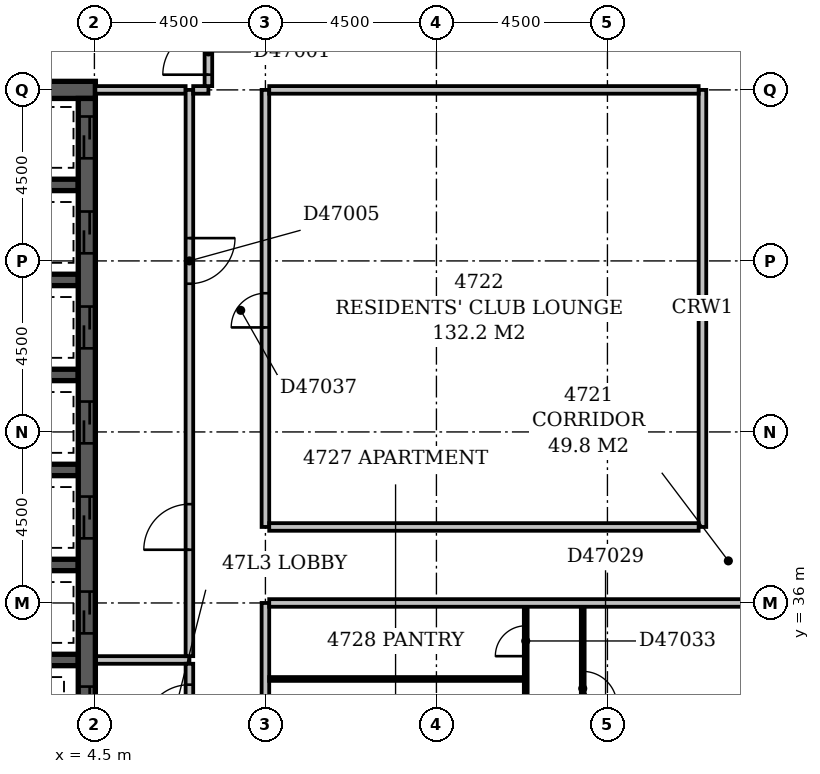
"""IFC4 building model, lengths in metres.
Left out: names, types, materials, properties, quantities, classifications, styles, units other than length and angle.
Written with IfcOpenShell. Run it as: python <this file> out.ifc"""

import sys

from ifc_helpers import new_model, si_unit, direction, frame, frame_2d, origin, place, context, subcontext, project, spatial, rectangle, extrude, element, fill, save


model = new_model("IFC4")
c1 = context("Model", 3, precision=1e-05, world=origin(), true_north=direction((0.0, 1.0)))
c2 = subcontext(c1, "Body", "Model", "MODEL_VIEW")
j1 = project(units=[si_unit("LENGTHUNIT", "METRE"), si_unit("PLANEANGLEUNIT", "RADIAN")], contexts=[c1])
p1 = place(None, origin())
s1 = spatial("IfcSite", under=j1, at=p1, CompositionType="ELEMENT")
p2 = place(p1, origin())
s2 = spatial("IfcBuilding", under=s1, at=p2, CompositionType="ELEMENT")
p3 = place(p2, frame((0.0, 0.0, 186.2)))
s3 = spatial("IfcBuildingStorey", under=s2, at=p3, CompositionType="ELEMENT", Elevation=186.2)
p4 = place(p3, frame((0.275, 49.5, -0.35), z_axis=(0.0, 0.0, 1.0), x_axis=(1.0, 0.0, 0.0)))
e1 = element("IfcWall", 1, at=p4, inside=s3, PredefinedType="SHEAR", context=c2, shape_type="SweptSolid", body=[
    extrude(rectangle(XDim=4.25, YDim=0.45, at=frame_2d((2.125, 0.0))), origin(), (0.0, 0.0, 1.0), 3.65),
])
for number, where, z_axis, x_axis in (
    (2, (0.725, 34.5, -0.35), (0.0, 0.0, 1.0), (1.0, 0.0, 0.0)),
    (3, (0.725, 37.0, -0.35), (0.0, 0.0, 1.0), (1.0, 0.0, 0.0)),
    (4, (0.725, 39.5, -0.35), (0.0, 0.0, 1.0), (1.0, 0.0, 0.0)),
    (5, (0.725, 42.0, -0.35), (0.0, 0.0, 1.0), (1.0, 0.0, 0.0)),
    (6, (0.725, 44.5, -0.35), (0.0, 0.0, 1.0), (1.0, 0.0, 0.0)),
    (7, (0.725, 47.0, -0.35), (0.0, 0.0, 1.0), (1.0, 0.0, 0.0)),
):
    element("IfcWall", number, at=place(p3, frame(where, z_axis=z_axis, x_axis=x_axis)), inside=s3, PredefinedType="SHEAR", context=c2, shape_type="SweptSolid", body=[
        extrude(rectangle(XDim=3.35, YDim=0.3, at=frame_2d((1.675, 0.0))), origin(), (0.0, 0.0, 1.0), 3.65),
    ])
p5 = place(p3, frame((4.3, 27.15, -0.35), z_axis=(0.0, 0.0, 1.0), x_axis=(0.0, 1.0, 0.0)))
e8 = element("IfcWall", 8, at=p5, inside=s3, PredefinedType="SHEAR", context=c2, shape_type="SweptSolid", body=[
    extrude(rectangle(XDim=22.125, YDim=0.45, at=frame_2d((11.062, 0.0))), origin(), (0.0, 0.0, 1.0), 3.65),
])
p6 = place(p5, frame((3.05, 0.0, 0.35)))
e9 = element("IfcOpeningElement", 9, at=p6, cuts=e8, PredefinedType="OPENING", context=c2, shape_type="SweptSolid", body=[
    extrude(rectangle(XDim=1.1, YDim=2.1, at=frame_2d((0.55, 1.05))), frame((0.0, 0.237, 0.0), z_axis=(0.0, -1.0, 0.0), x_axis=(1.0, 0.0, 0.0)), (0.0, 0.0, 1.0), 0.474),
])
p7 = place(p5, frame((0.55, 0.0, 0.35)))
e10 = element("IfcOpeningElement", 10, at=p7, cuts=e8, PredefinedType="OPENING", context=c2, shape_type="SweptSolid", body=[
    extrude(rectangle(XDim=1.1, YDim=2.1, at=frame_2d((0.55, 1.05))), frame((0.0, 0.237, 0.0), z_axis=(0.0, -1.0, 0.0), x_axis=(1.0, 0.0, 0.0)), (0.0, 0.0, 1.0), 0.474),
])
p8 = place(p5, frame((20.55, 0.0, 0.35)))
e11 = element("IfcOpeningElement", 11, at=p8, cuts=e8, PredefinedType="OPENING", context=c2, shape_type="SweptSolid", body=[
    extrude(rectangle(XDim=1.1, YDim=2.1, at=frame_2d((0.55, 1.05))), frame((0.0, 0.237, 0.0), z_axis=(0.0, -1.0, 0.0), x_axis=(1.0, 0.0, 0.0)), (0.0, 0.0, 1.0), 0.474),
])
p9 = place(p5, frame((18.05, 0.0, 0.35)))
e12 = element("IfcOpeningElement", 12, at=p9, cuts=e8, PredefinedType="OPENING", context=c2, shape_type="SweptSolid", body=[
    extrude(rectangle(XDim=1.1, YDim=2.1, at=frame_2d((0.55, 1.05))), frame((0.0, 0.237, 0.0), z_axis=(0.0, -1.0, 0.0), x_axis=(1.0, 0.0, 0.0)), (0.0, 0.0, 1.0), 0.474),
])
p10 = place(p5, frame((15.55, 0.0, 0.35)))
e13 = element("IfcOpeningElement", 13, at=p10, cuts=e8, PredefinedType="OPENING", context=c2, shape_type="SweptSolid", body=[
    extrude(rectangle(XDim=1.1, YDim=2.1, at=frame_2d((0.55, 1.05))), frame((0.0, 0.237, 0.0), z_axis=(0.0, -1.0, 0.0), x_axis=(1.0, 0.0, 0.0)), (0.0, 0.0, 1.0), 0.474),
])
p11 = place(p5, frame((13.05, 0.0, 0.35)))
e14 = element("IfcOpeningElement", 14, at=p11, cuts=e8, PredefinedType="OPENING", context=c2, shape_type="SweptSolid", body=[
    extrude(rectangle(XDim=1.1, YDim=2.1, at=frame_2d((0.55, 1.05))), frame((0.0, 0.237, 0.0), z_axis=(0.0, -1.0, 0.0), x_axis=(1.0, 0.0, 0.0)), (0.0, 0.0, 1.0), 0.474),
])
p12 = place(p5, frame((10.55, 0.0, 0.35)))
e15 = element("IfcOpeningElement", 15, at=p12, cuts=e8, PredefinedType="OPENING", context=c2, shape_type="SweptSolid", body=[
    extrude(rectangle(XDim=1.1, YDim=2.1, at=frame_2d((0.55, 1.05))), frame((0.0, 0.237, 0.0), z_axis=(0.0, -1.0, 0.0), x_axis=(1.0, 0.0, 0.0)), (0.0, 0.0, 1.0), 0.474),
])
p13 = place(p5, frame((8.05, 0.0, 0.35)))
e16 = element("IfcOpeningElement", 16, at=p13, cuts=e8, PredefinedType="OPENING", context=c2, shape_type="SweptSolid", body=[
    extrude(rectangle(XDim=1.1, YDim=2.1, at=frame_2d((0.55, 1.05))), frame((0.0, 0.237, 0.0), z_axis=(0.0, -1.0, 0.0), x_axis=(1.0, 0.0, 0.0)), (0.0, 0.0, 1.0), 0.474),
])
p14 = place(p5, frame((5.55, 0.0, 0.35)))
e17 = element("IfcOpeningElement", 17, at=p14, cuts=e8, PredefinedType="OPENING", context=c2, shape_type="SweptSolid", body=[
    extrude(rectangle(XDim=1.1, YDim=2.1, at=frame_2d((0.55, 1.05))), frame((0.0, 0.237, 0.0), z_axis=(0.0, -1.0, 0.0), x_axis=(1.0, 0.0, 0.0)), (0.0, 0.0, 1.0), 0.474),
])
p15 = place(p3, frame((4.545, 34.5, 0.0), z_axis=(0.0, 0.0, 1.0), x_axis=(1.0, 0.0, 0.0)))
e18 = element("IfcWall", 18, at=p15, inside=s3, PredefinedType="PARTITIONING", context=c2, shape_type="SweptSolid", body=[
    extrude(rectangle(XDim=2.455, YDim=0.2, at=frame_2d((1.228, 0.0))), origin(), (0.0, 0.0, 1.0), 3.3),
])
p16 = place(p3, frame((7.0, 34.6, 0.0), z_axis=(0.0, 0.0, 1.0), x_axis=(0.0, 1.0, 0.0)))
e19 = element("IfcWall", 19, at=p16, inside=s3, PredefinedType="PARTITIONING", context=c2, shape_type="SweptSolid", body=[
    extrude(rectangle(XDim=14.9, YDim=0.2, at=frame_2d((7.45, 0.0))), origin(), (0.0, 0.0, 1.0), 3.3),
])
p17 = place(p16, frame((2.8, 0.0, 0.0)))
e20 = element("IfcOpeningElement", 20, at=p17, cuts=e19, PredefinedType="OPENING", context=c2, shape_type="SweptSolid", body=[
    extrude(rectangle(XDim=1.2, YDim=2.1, at=frame_2d((0.6, 1.05))), frame((0.0, 0.112, 0.0), z_axis=(0.0, -1.0, 0.0), x_axis=(1.0, 0.0, 0.0)), (0.0, 0.0, 1.0), 0.224),
])
p18 = place(p16, frame((9.8, 0.0, 0.0)))
e21 = element("IfcOpeningElement", 21, at=p18, cuts=e19, PredefinedType="OPENING", context=c2, shape_type="SweptSolid", body=[
    extrude(rectangle(XDim=1.2, YDim=2.1, at=frame_2d((0.6, 1.05))), frame((0.0, 0.112, 0.0), z_axis=(0.0, -1.0, 0.0), x_axis=(1.0, 0.0, 0.0)), (0.0, 0.0, 1.0), 0.224),
])
p19 = place(p3, frame((4.525, 49.5, 0.0), z_axis=(0.0, 0.0, 1.0), x_axis=(1.0, 0.0, 0.0)))
e22 = element("IfcWall", 22, at=p19, inside=s3, PredefinedType="PARTITIONING", context=c2, shape_type="SweptSolid", body=[
    extrude(rectangle(XDim=2.375, YDim=0.2, at=frame_2d((1.188, 0.0))), origin(), (0.0, 0.0, 1.0), 3.3),
])
p20 = place(p3, frame((7.0, 32.1, 0.0), z_axis=(0.0, 0.0, 1.0), x_axis=(0.0, 1.0, 0.0)))
e23 = element("IfcWall", 23, at=p20, inside=s3, PredefinedType="PARTITIONING", context=c2, shape_type="SweptSolid", body=[
    extrude(rectangle(XDim=2.3, YDim=0.2, at=frame_2d((1.15, 0.0))), origin(), (0.0, 0.0, 1.0), 3.3),
])
p21 = place(p20, frame((0.55, 0.0, 0.0)))
e24 = element("IfcOpeningElement", 24, at=p21, cuts=e23, PredefinedType="OPENING", context=c2, shape_type="SweptSolid", body=[
    extrude(rectangle(XDim=1.2, YDim=2.1, at=frame_2d((0.6, 1.05))), frame((0.0, 0.112, 0.0), z_axis=(0.0, -1.0, 0.0), x_axis=(1.0, 0.0, 0.0)), (0.0, 0.0, 1.0), 0.224),
])
p22 = place(p3, frame((7.1, 49.5, 0.0), z_axis=(0.0, 0.0, 1.0), x_axis=(1.0, 0.0, 0.0)))
e25 = element("IfcWall", 25, at=p22, inside=s3, PredefinedType="PARTITIONING", context=c2, shape_type="SweptSolid", body=[
    extrude(rectangle(XDim=0.4, YDim=0.2, at=frame_2d((0.2, 0.0))), origin(), (0.0, 0.0, 1.0), 3.3),
])
p23 = place(p3, frame((7.5, 49.6, 0.0), z_axis=(0.0, 0.0, 1.0), x_axis=(0.0, 1.0, 0.0)))
e26 = element("IfcWall", 26, at=p23, inside=s3, PredefinedType="PARTITIONING", context=c2, shape_type="SweptSolid", body=[
    extrude(rectangle(XDim=3.9, YDim=0.2, at=frame_2d((1.95, 0.0))), origin(), (0.0, 0.0, 1.0), 3.3),
])
p24 = place(p23, frame((0.3, 0.0, 0.0)))
e27 = element("IfcOpeningElement", 27, at=p24, cuts=e26, PredefinedType="OPENING", context=c2, shape_type="SweptSolid", body=[
    extrude(rectangle(XDim=1.2, YDim=2.1, at=frame_2d((0.6, 1.05))), frame((0.0, 0.112, 0.0), z_axis=(0.0, -1.0, 0.0), x_axis=(1.0, 0.0, 0.0)), (0.0, 0.0, 1.0), 0.224),
])
p25 = place(p3, frame((9.0, 5.0, 0.0), z_axis=(0.0, 0.0, 1.0), x_axis=(0.0, 1.0, 0.0)))
e28 = element("IfcWall", 28, at=p25, inside=s3, PredefinedType="PARTITIONING", context=c2, shape_type="SweptSolid", body=[
    extrude(rectangle(XDim=31.0, YDim=0.2, at=frame_2d((15.5, 0.0))), origin(), (0.0, 0.0, 1.0), 3.3),
])
p26 = place(p25, frame((17.8, 0.0, 0.0)))
e29 = element("IfcOpeningElement", 29, at=p26, cuts=e28, PredefinedType="OPENING", context=c2, shape_type="SweptSolid", body=[
    extrude(rectangle(XDim=1.0, YDim=2.1, at=frame_2d((0.5, 1.05))), frame((0.0, 0.112, 0.0), z_axis=(0.0, -1.0, 0.0), x_axis=(1.0, 0.0, 0.0)), (0.0, 0.0, 1.0), 0.224),
])
p27 = place(p25, frame((14.95, 0.0, 0.0)))
e30 = element("IfcOpeningElement", 30, at=p27, cuts=e28, PredefinedType="OPENING", context=c2, shape_type="SweptSolid", body=[
    extrude(rectangle(XDim=1.0, YDim=2.1, at=frame_2d((0.5, 1.05))), frame((0.0, 0.112, 0.0), z_axis=(0.0, -1.0, 0.0), x_axis=(1.0, 0.0, 0.0)), (0.0, 0.0, 1.0), 0.224),
])
p28 = place(p25, frame((9.3, 0.0, 0.0)))
e31 = element("IfcOpeningElement", 31, at=p28, cuts=e28, PredefinedType="OPENING", context=c2, shape_type="SweptSolid", body=[
    extrude(rectangle(XDim=1.0, YDim=2.1, at=frame_2d((0.5, 1.05))), frame((0.0, 0.112, 0.0), z_axis=(0.0, -1.0, 0.0), x_axis=(1.0, 0.0, 0.0)), (0.0, 0.0, 1.0), 0.224),
])
p29 = place(p25, frame((1.5, 0.0, 0.0)))
e32 = element("IfcOpeningElement", 32, at=p29, cuts=e28, PredefinedType="OPENING", context=c2, shape_type="SweptSolid", body=[
    extrude(rectangle(XDim=0.9, YDim=2.1, at=frame_2d((0.45, 1.05))), frame((0.0, 0.112, 0.0), z_axis=(0.0, -1.0, 0.0), x_axis=(1.0, 0.0, 0.0)), (0.0, 0.0, 1.0), 0.224),
])
p30 = place(p3, frame((17.35, 22.6, 0.0), z_axis=(0.0, 0.0, 1.0), x_axis=(0.0, 1.0, 0.0)))
e33 = element("IfcWall", 33, at=p30, inside=s3, PredefinedType="PARTITIONING", context=c2, shape_type="SweptSolid", body=[
    extrude(rectangle(XDim=13.3, YDim=0.1, at=frame_2d((6.65, 0.0))), origin(), (0.0, 0.0, 1.0), 3.3),
])
p31 = place(p30, frame((1.7, 0.0, 0.0)))
e34 = element("IfcOpeningElement", 34, at=p31, cuts=e33, PredefinedType="OPENING", context=c2, shape_type="SweptSolid", body=[
    extrude(rectangle(XDim=0.9, YDim=2.1, at=frame_2d((0.45, 1.05))), frame((0.0, 0.062, 0.0), z_axis=(0.0, -1.0, 0.0), x_axis=(1.0, 0.0, 0.0)), (0.0, 0.0, 1.0), 0.124),
])
p32 = place(p30, frame((7.35, 0.0, 0.0)))
e35 = element("IfcOpeningElement", 35, at=p32, cuts=e33, PredefinedType="OPENING", context=c2, shape_type="SweptSolid", body=[
    extrude(rectangle(XDim=0.9, YDim=2.1, at=frame_2d((0.45, 1.05))), frame((0.0, 0.062, 0.0), z_axis=(0.0, -1.0, 0.0), x_axis=(1.0, 0.0, 0.0)), (0.0, 0.0, 1.0), 0.124),
])
p33 = place(p30, frame((10.7, 0.0, 0.0)))
e36 = element("IfcOpeningElement", 36, at=p33, cuts=e33, PredefinedType="OPENING", context=c2, shape_type="SweptSolid", body=[
    extrude(rectangle(XDim=0.9, YDim=2.1, at=frame_2d((0.45, 1.05))), frame((0.0, 0.062, 0.0), z_axis=(0.0, -1.0, 0.0), x_axis=(1.0, 0.0, 0.0)), (0.0, 0.0, 1.0), 0.124),
])
p34 = place(p3, frame((15.85, 24.1, 0.0), z_axis=(0.0, 0.0, 1.0), x_axis=(0.0, 1.0, 0.0)))
e37 = element("IfcWall", 37, at=p34, inside=s3, PredefinedType="PARTITIONING", context=c2, shape_type="SweptSolid", body=[
    extrude(rectangle(XDim=11.8, YDim=0.1, at=frame_2d((5.9, 0.0))), origin(), (0.0, 0.0, 1.0), 3.3),
])
p35 = place(p34, frame((4.7, 0.0, 0.0)))
e38 = element("IfcOpeningElement", 38, at=p35, cuts=e37, PredefinedType="OPENING", context=c2, shape_type="SweptSolid", body=[
    extrude(rectangle(XDim=0.8, YDim=2.1, at=frame_2d((0.4, 1.05))), frame((0.0, 0.062, 0.0), z_axis=(0.0, -1.0, 0.0), x_axis=(1.0, 0.0, 0.0)), (0.0, 0.0, 1.0), 0.124),
])
p36 = place(p34, frame((1.5, 0.0, 0.0)))
e39 = element("IfcOpeningElement", 39, at=p36, cuts=e37, PredefinedType="OPENING", context=c2, shape_type="SweptSolid", body=[
    extrude(rectangle(XDim=0.9, YDim=2.1, at=frame_2d((0.45, 1.05))), frame((0.0, 0.062, 0.0), z_axis=(0.0, -1.0, 0.0), x_axis=(1.0, 0.0, 0.0)), (0.0, 0.0, 1.0), 0.124),
])
p37 = place(p34, frame((10.5, 0.0, 0.0)))
e40 = element("IfcOpeningElement", 40, at=p37, cuts=e37, PredefinedType="OPENING", context=c2, shape_type="SweptSolid", body=[
    extrude(rectangle(XDim=0.8, YDim=2.1, at=frame_2d((0.4, 1.05))), frame((0.0, 0.062, 0.0), z_axis=(0.0, -1.0, 0.0), x_axis=(1.0, 0.0, 0.0)), (0.0, 0.0, 1.0), 0.124),
])
p38 = place(p34, frame((6.7, 0.0, 0.0)))
e41 = element("IfcOpeningElement", 41, at=p38, cuts=e37, PredefinedType="OPENING", context=c2, shape_type="SweptSolid", body=[
    extrude(rectangle(XDim=0.8, YDim=2.1, at=frame_2d((0.4, 1.05))), frame((0.0, 0.062, 0.0), z_axis=(0.0, -1.0, 0.0), x_axis=(1.0, 0.0, 0.0)), (0.0, 0.0, 1.0), 0.124),
])
p39 = place(p34, frame((8.5, 0.0, 0.0)))
e42 = element("IfcOpeningElement", 42, at=p39, cuts=e37, PredefinedType="OPENING", context=c2, shape_type="SweptSolid", body=[
    extrude(rectangle(XDim=0.8, YDim=2.1, at=frame_2d((0.4, 1.05))), frame((0.0, 0.062, 0.0), z_axis=(0.0, -1.0, 0.0), x_axis=(1.0, 0.0, 0.0)), (0.0, 0.0, 1.0), 0.124),
])
p40 = place(p3, frame((9.1, 34.0, 0.0), z_axis=(0.0, 0.0, 1.0), x_axis=(1.0, 0.0, 0.0)))
e43 = element("IfcWall", 43, at=p40, inside=s3, PredefinedType="PARTITIONING", context=c2, shape_type="SweptSolid", body=[
    extrude(rectangle(XDim=6.7, YDim=0.1, at=frame_2d((3.35, 0.0))), origin(), (0.0, 0.0, 1.0), 3.3),
])
p41 = place(p3, frame((9.1, 36.0, 0.0), z_axis=(0.0, 0.0, 1.0), x_axis=(1.0, 0.0, 0.0)))
e44 = element("IfcWall", 44, at=p41, inside=s3, PredefinedType="PARTITIONING", context=c2, shape_type="SweptSolid", body=[
    extrude(rectangle(XDim=12.95, YDim=0.2, at=frame_2d((6.475, 0.0))), origin(), (0.0, 0.0, 1.0), 3.3),
])
p42 = place(p3, frame((9.0, 38.0, 0.0), z_axis=(0.0, 0.0, 1.0), x_axis=(0.0, 1.0, 0.0)))
e45 = element("IfcWall", 45, at=p42, inside=s3, PredefinedType="PARTITIONING", context=c2, shape_type="SweptSolid", body=[
    extrude(rectangle(XDim=11.5, YDim=0.2, at=frame_2d((5.75, 0.0))), origin(), (0.0, 0.0, 1.0), 3.3),
])
p43 = place(p42, frame((5.25, 0.0, 0.0)))
e46 = element("IfcOpeningElement", 46, at=p43, cuts=e45, PredefinedType="OPENING", context=c2, shape_type="SweptSolid", body=[
    extrude(rectangle(XDim=0.9, YDim=2.1, at=frame_2d((0.45, 1.05))), frame((0.0, 0.112, 0.0), z_axis=(0.0, -1.0, 0.0), x_axis=(1.0, 0.0, 0.0)), (0.0, 0.0, 1.0), 0.224),
])
p44 = place(p3, frame((9.1, 38.0, 0.0), z_axis=(0.0, 0.0, 1.0), x_axis=(1.0, 0.0, 0.0)))
e47 = element("IfcWall", 47, at=p44, inside=s3, PredefinedType="PARTITIONING", context=c2, shape_type="SweptSolid", body=[
    extrude(rectangle(XDim=11.3, YDim=0.2, at=frame_2d((5.65, 0.0))), origin(), (0.0, 0.0, 1.0), 3.3),
])
p45 = place(p3, frame((20.5, 38.0, 0.0), z_axis=(0.0, 0.0, 1.0), x_axis=(0.0, 1.0, 0.0)))
e48 = element("IfcWall", 48, at=p45, inside=s3, PredefinedType="PARTITIONING", context=c2, shape_type="SweptSolid", body=[
    extrude(rectangle(XDim=11.5, YDim=0.2, at=frame_2d((5.75, 0.0))), origin(), (0.0, 0.0, 1.0), 3.3),
])
p46 = place(p3, frame((9.1, 49.5, 0.0), z_axis=(0.0, 0.0, 1.0), x_axis=(1.0, 0.0, 0.0)))
e49 = element("IfcWall", 49, at=p46, inside=s3, PredefinedType="PARTITIONING", context=c2, shape_type="SweptSolid", body=[
    extrude(rectangle(XDim=11.3, YDim=0.2, at=frame_2d((5.65, 0.0))), origin(), (0.0, 0.0, 1.0), 3.3),
])
p47 = place(p24, origin())
e50 = element("IfcDoor", 50, at=p47, inside=s3, OperationType="SINGLE_SWING_LEFT", PredefinedType="DOOR", context=c2, shape_type="SweptSolid", body=[
    extrude(rectangle(XDim=1.2, YDim=2.1, at=frame_2d((0.6, 1.05))), frame((0.0, 0.025, 0.0), z_axis=(0.0, -1.0, 0.0), x_axis=(1.0, 0.0, 0.0)), (0.0, 0.0, 1.0), 0.05),
])
fill(e27, e50)
p48 = place(p8, origin())
e51 = element("IfcDoor", 51, at=p48, inside=s3, OperationType="SLIDING_TO_LEFT", PredefinedType="DOOR", context=c2, shape_type="SweptSolid", body=[
    extrude(rectangle(XDim=1.1, YDim=2.1, at=frame_2d((0.55, 1.05))), frame((0.0, 0.025, 0.0), z_axis=(0.0, -1.0, 0.0), x_axis=(1.0, 0.0, 0.0)), (0.0, 0.0, 1.0), 0.05),
])
fill(e11, e51)
p49 = place(p9, origin())
e52 = element("IfcDoor", 52, at=p49, inside=s3, OperationType="SLIDING_TO_LEFT", PredefinedType="DOOR", context=c2, shape_type="SweptSolid", body=[
    extrude(rectangle(XDim=1.1, YDim=2.1, at=frame_2d((0.55, 1.05))), frame((0.0, 0.025, 0.0), z_axis=(0.0, -1.0, 0.0), x_axis=(1.0, 0.0, 0.0)), (0.0, 0.0, 1.0), 0.05),
])
fill(e12, e52)
p50 = place(p10, origin())
e53 = element("IfcDoor", 53, at=p50, inside=s3, OperationType="SLIDING_TO_LEFT", PredefinedType="DOOR", context=c2, shape_type="SweptSolid", body=[
    extrude(rectangle(XDim=1.1, YDim=2.1, at=frame_2d((0.55, 1.05))), frame((0.0, 0.025, 0.0), z_axis=(0.0, -1.0, 0.0), x_axis=(1.0, 0.0, 0.0)), (0.0, 0.0, 1.0), 0.05),
])
fill(e13, e53)
p51 = place(p11, origin())
e54 = element("IfcDoor", 54, at=p51, inside=s3, OperationType="SLIDING_TO_LEFT", PredefinedType="DOOR", context=c2, shape_type="SweptSolid", body=[
    extrude(rectangle(XDim=1.1, YDim=2.1, at=frame_2d((0.55, 1.05))), frame((0.0, 0.025, 0.0), z_axis=(0.0, -1.0, 0.0), x_axis=(1.0, 0.0, 0.0)), (0.0, 0.0, 1.0), 0.05),
])
fill(e14, e54)
p52 = place(p12, origin())
e55 = element("IfcDoor", 55, at=p52, inside=s3, OperationType="SLIDING_TO_LEFT", PredefinedType="DOOR", context=c2, shape_type="SweptSolid", body=[
    extrude(rectangle(XDim=1.1, YDim=2.1, at=frame_2d((0.55, 1.05))), frame((0.0, 0.025, 0.0), z_axis=(0.0, -1.0, 0.0), x_axis=(1.0, 0.0, 0.0)), (0.0, 0.0, 1.0), 0.05),
])
fill(e15, e55)
p53 = place(p13, origin())
e56 = element("IfcDoor", 56, at=p53, inside=s3, OperationType="SLIDING_TO_LEFT", PredefinedType="DOOR", context=c2, shape_type="SweptSolid", body=[
    extrude(rectangle(XDim=1.1, YDim=2.1, at=frame_2d((0.55, 1.05))), frame((0.0, 0.025, 0.0), z_axis=(0.0, -1.0, 0.0), x_axis=(1.0, 0.0, 0.0)), (0.0, 0.0, 1.0), 0.05),
])
fill(e16, e56)
p54 = place(p17, origin())
e57 = element("IfcDoor", 57, at=p54, inside=s3, OperationType="SINGLE_SWING_LEFT", PredefinedType="DOOR", context=c2, shape_type="SweptSolid", body=[
    extrude(rectangle(XDim=1.2, YDim=2.1, at=frame_2d((0.6, 1.05))), frame((0.0, 0.025, 0.0), z_axis=(0.0, -1.0, 0.0), x_axis=(1.0, 0.0, 0.0)), (0.0, 0.0, 1.0), 0.05),
])
fill(e20, e57)
p55 = place(p18, origin())
e58 = element("IfcDoor", 58, at=p55, inside=s3, OperationType="SINGLE_SWING_RIGHT", PredefinedType="DOOR", context=c2, shape_type="SweptSolid", body=[
    extrude(rectangle(XDim=1.2, YDim=2.1, at=frame_2d((0.6, 1.05))), frame((0.0, 0.025, 0.0), z_axis=(0.0, -1.0, 0.0), x_axis=(1.0, 0.0, 0.0)), (0.0, 0.0, 1.0), 0.05),
])
fill(e21, e58)
p56 = place(p21, origin())
e59 = element("IfcDoor", 59, at=p56, inside=s3, OperationType="SINGLE_SWING_LEFT", PredefinedType="DOOR", context=c2, shape_type="SweptSolid", body=[
    extrude(rectangle(XDim=1.2, YDim=2.1, at=frame_2d((0.6, 1.05))), frame((0.0, 0.025, 0.0), z_axis=(0.0, -1.0, 0.0), x_axis=(1.0, 0.0, 0.0)), (0.0, 0.0, 1.0), 0.05),
])
fill(e24, e59)
p57 = place(p14, origin())
e60 = element("IfcDoor", 60, at=p57, inside=s3, OperationType="SLIDING_TO_LEFT", PredefinedType="DOOR", context=c2, shape_type="SweptSolid", body=[
    extrude(rectangle(XDim=1.1, YDim=2.1, at=frame_2d((0.55, 1.05))), frame((0.0, 0.025, 0.0), z_axis=(0.0, -1.0, 0.0), x_axis=(1.0, 0.0, 0.0)), (0.0, 0.0, 1.0), 0.05),
])
fill(e17, e60)
p58 = place(p33, frame((0.9, 0.0, 0.0), z_axis=(0.0, 0.0, 1.0), x_axis=(-1.0, 0.0, 0.0)))
e61 = element("IfcDoor", 61, at=p58, inside=s3, OperationType="SINGLE_SWING_RIGHT", PredefinedType="DOOR", context=c2, shape_type="SweptSolid", body=[
    extrude(rectangle(XDim=0.9, YDim=2.1, at=frame_2d((0.45, 1.05))), frame((0.0, 0.025, 0.0), z_axis=(0.0, -1.0, 0.0), x_axis=(1.0, 0.0, 0.0)), (0.0, 0.0, 1.0), 0.05),
])
fill(e36, e61)
p59 = place(p37, origin())
e62 = element("IfcDoor", 62, at=p59, inside=s3, OperationType="SINGLE_SWING_LEFT", PredefinedType="DOOR", context=c2, shape_type="SweptSolid", body=[
    extrude(rectangle(XDim=0.8, YDim=2.1, at=frame_2d((0.4, 1.05))), frame((0.0, 0.025, 0.0), z_axis=(0.0, -1.0, 0.0), x_axis=(1.0, 0.0, 0.0)), (0.0, 0.0, 1.0), 0.05),
])
fill(e40, e62)
p60 = place(p43, origin())
e63 = element("IfcDoor", 63, at=p60, inside=s3, OperationType="SINGLE_SWING_LEFT", PredefinedType="DOOR", context=c2, shape_type="SweptSolid", body=[
    extrude(rectangle(XDim=0.9, YDim=2.1, at=frame_2d((0.45, 1.05))), frame((0.0, 0.025, 0.0), z_axis=(0.0, -1.0, 0.0), x_axis=(1.0, 0.0, 0.0)), (0.0, 0.0, 1.0), 0.05),
])
fill(e46, e63)
save(model, sys.argv[1])
